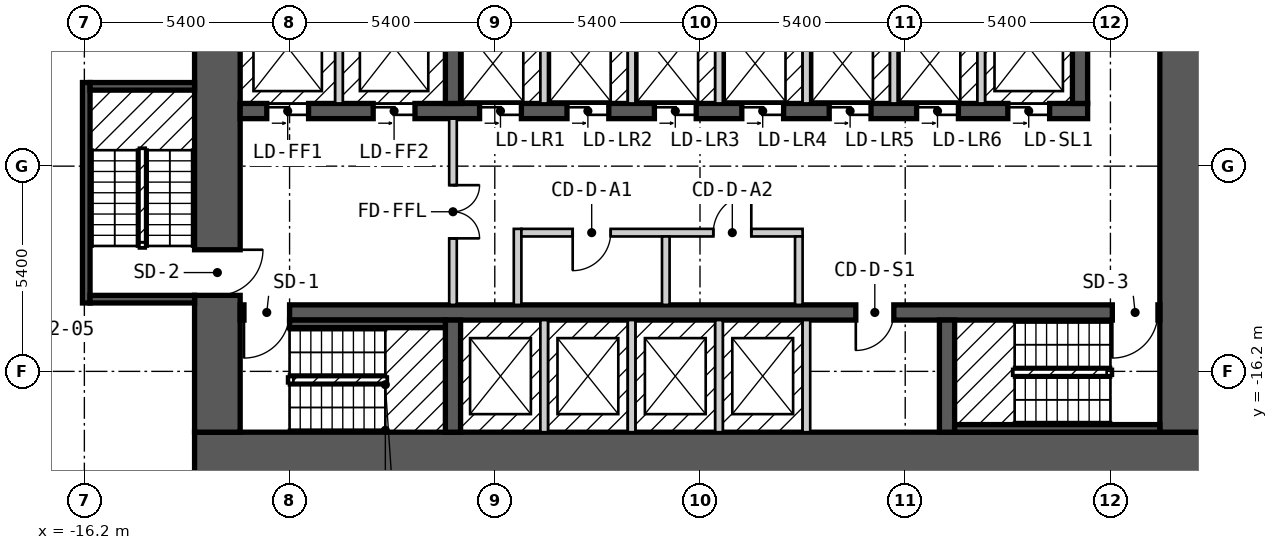
"""IFC4 building model, lengths in metres.
Left out: names, types, materials, properties, quantities, classifications, styles, units other than length and angle.
Written with IfcOpenShell. Run it as: python <this file> out.ifc"""

import sys

from ifc_helpers import new_model, si_unit, direction, frame, frame_2d, origin, place, context, subcontext, project, spatial, rectangle, extrude, element, fill, save


model = new_model("IFC4")
c1 = context("Model", 3, precision=1e-05, world=origin(), true_north=direction((0.0, 1.0)))
c2 = subcontext(c1, "Body", "Model", "MODEL_VIEW")
j1 = project(units=[si_unit("LENGTHUNIT", "METRE"), si_unit("PLANEANGLEUNIT", "RADIAN")], contexts=[c1])
p1 = place(None, origin())
s1 = spatial("IfcSite", under=j1, at=p1, CompositionType="ELEMENT")
p2 = place(p1, origin())
s2 = spatial("IfcBuilding", under=s1, at=p2, CompositionType="ELEMENT")
p3 = place(p2, frame((0.0, 0.0, 9.0)))
s3 = spatial("IfcBuildingStorey", under=s2, at=p3, CompositionType="ELEMENT", Elevation=9.0)
p4 = place(p3, frame((-13.3, -18.4, 0.0), z_axis=(0.0, 0.0, 1.0), x_axis=(1.0, 0.0, 0.0)))
e1 = element("IfcWall", 1, at=p4, inside=s3, PredefinedType="SHEAR", context=c2, shape_type="SweptSolid", body=[
    extrude(rectangle(XDim=26.6, YDim=1.2, at=frame_2d((13.3, 0.0))), origin(), (0.0, 0.0, 1.0), 3.25),
])
p5 = place(p3, frame((-12.7, -17.8, 0.0), z_axis=(0.0, 0.0, 1.0), x_axis=(0.0, 1.0, 0.0)))
e2 = element("IfcWall", 2, at=p5, inside=s3, PredefinedType="SHEAR", context=c2, shape_type="SweptSolid", body=[
    extrude(rectangle(XDim=11.6, YDim=1.2, at=frame_2d((5.8, 0.0))), origin(), (0.0, 0.0, 1.0), 3.25),
])
p6 = place(p5, frame((3.6, 0.0, 0.0)))
e3 = element("IfcOpeningElement", 3, at=p6, cuts=e2, PredefinedType="OPENING", context=c2, shape_type="SweptSolid", body=[
    extrude(rectangle(XDim=1.2, YDim=2.1, at=frame_2d((0.6, 1.05))), frame((0.0, 0.61, 0.0), z_axis=(0.0, -1.0, 0.0), x_axis=(1.0, 0.0, 0.0)), (0.0, 0.0, 1.0), 1.22),
])
p7 = place(p3, frame((12.7, -17.8, 0.0), z_axis=(0.0, 0.0, 1.0), x_axis=(0.0, 1.0, 0.0)))
e4 = element("IfcWall", 4, at=p7, inside=s3, PredefinedType="SHEAR", context=c2, shape_type="SweptSolid", body=[
    extrude(rectangle(XDim=11.6, YDim=1.2, at=frame_2d((5.8, 0.0))), origin(), (0.0, 0.0, 1.0), 3.25),
])
p8 = place(p3, frame((-12.1, -14.65, 0.0), z_axis=(0.0, 0.0, 1.0), x_axis=(1.0, 0.0, 0.0)))
e5 = element("IfcWall", 5, at=p8, inside=s3, PredefinedType="SHEAR", context=c2, shape_type="SweptSolid", body=[
    extrude(rectangle(XDim=24.2, YDim=0.4, at=frame_2d((12.1, 0.0))), origin(), (0.0, 0.0, 1.0), 3.25),
])
p9 = place(p8, frame((1.3, 0.0, 0.0), z_axis=(0.0, 0.0, 1.0), x_axis=(-1.0, 0.0, 0.0)))
e6 = element("IfcOpeningElement", 6, at=p9, cuts=e5, PredefinedType="OPENING", context=c2, shape_type="SweptSolid", body=[
    extrude(rectangle(XDim=1.2, YDim=2.1, at=frame_2d((0.6, 1.05))), frame((0.0, 0.21, 0.0), z_axis=(0.0, -1.0, 0.0), x_axis=(1.0, 0.0, 0.0)), (0.0, 0.0, 1.0), 0.42),
])
p10 = place(p8, frame((24.15, 0.0, 0.0), z_axis=(0.0, 0.0, 1.0), x_axis=(-1.0, 0.0, 0.0)))
e7 = element("IfcOpeningElement", 7, at=p10, cuts=e5, PredefinedType="OPENING", context=c2, shape_type="SweptSolid", body=[
    extrude(rectangle(XDim=1.2, YDim=2.1, at=frame_2d((0.6, 1.05))), frame((0.0, 0.21, 0.0), z_axis=(0.0, -1.0, 0.0), x_axis=(1.0, 0.0, 0.0)), (0.0, 0.0, 1.0), 0.42),
])
p11 = place(p8, frame((17.2, 0.0, 0.0), z_axis=(0.0, 0.0, 1.0), x_axis=(-1.0, 0.0, 0.0)))
e8 = element("IfcOpeningElement", 8, at=p11, cuts=e5, PredefinedType="OPENING", context=c2, shape_type="SweptSolid", body=[
    extrude(rectangle(XDim=1.0, YDim=2.1, at=frame_2d((0.5, 1.05))), frame((0.0, 0.21, 0.0), z_axis=(0.0, -1.0, 0.0), x_axis=(1.0, 0.0, 0.0)), (0.0, 0.0, 1.0), 0.42),
])
p12 = place(p3, frame((-12.1, -9.35, 0.0), z_axis=(0.0, 0.0, 1.0), x_axis=(1.0, 0.0, 0.0)))
e9 = element("IfcWall", 9, at=p12, inside=s3, PredefinedType="SHEAR", context=c2, shape_type="SweptSolid", body=[
    extrude(rectangle(XDim=22.3, YDim=0.4, at=frame_2d((11.15, 0.0))), origin(), (0.0, 0.0, 1.0), 3.25),
])
p13 = place(p12, frame((0.7, 0.0, 0.0)))
e10 = element("IfcOpeningElement", 10, at=p13, cuts=e9, PredefinedType="OPENING", context=c2, shape_type="SweptSolid", body=[
    extrude(rectangle(XDim=1.1, YDim=2.1, at=frame_2d((0.55, 1.05))), frame((0.0, 0.21, 0.0), z_axis=(0.0, -1.0, 0.0), x_axis=(1.0, 0.0, 0.0)), (0.0, 0.0, 1.0), 0.42),
])
p14 = place(p12, frame((3.5, 0.0, 0.0)))
e11 = element("IfcOpeningElement", 11, at=p14, cuts=e9, PredefinedType="OPENING", context=c2, shape_type="SweptSolid", body=[
    extrude(rectangle(XDim=1.1, YDim=2.1, at=frame_2d((0.55, 1.05))), frame((0.0, 0.21, 0.0), z_axis=(0.0, -1.0, 0.0), x_axis=(1.0, 0.0, 0.0)), (0.0, 0.0, 1.0), 0.42),
])
p15 = place(p12, frame((6.3, 0.0, 0.0)))
e12 = element("IfcOpeningElement", 12, at=p15, cuts=e9, PredefinedType="OPENING", context=c2, shape_type="SweptSolid", body=[
    extrude(rectangle(XDim=1.1, YDim=2.1, at=frame_2d((0.55, 1.05))), frame((0.0, 0.21, 0.0), z_axis=(0.0, -1.0, 0.0), x_axis=(1.0, 0.0, 0.0)), (0.0, 0.0, 1.0), 0.42),
])
p16 = place(p12, frame((8.6, 0.0, 0.0)))
e13 = element("IfcOpeningElement", 13, at=p16, cuts=e9, PredefinedType="OPENING", context=c2, shape_type="SweptSolid", body=[
    extrude(rectangle(XDim=1.1, YDim=2.1, at=frame_2d((0.55, 1.05))), frame((0.0, 0.21, 0.0), z_axis=(0.0, -1.0, 0.0), x_axis=(1.0, 0.0, 0.0)), (0.0, 0.0, 1.0), 0.42),
])
p17 = place(p12, frame((10.9, 0.0, 0.0)))
e14 = element("IfcOpeningElement", 14, at=p17, cuts=e9, PredefinedType="OPENING", context=c2, shape_type="SweptSolid", body=[
    extrude(rectangle(XDim=1.1, YDim=2.1, at=frame_2d((0.55, 1.05))), frame((0.0, 0.21, 0.0), z_axis=(0.0, -1.0, 0.0), x_axis=(1.0, 0.0, 0.0)), (0.0, 0.0, 1.0), 0.42),
])
p18 = place(p12, frame((13.2, 0.0, 0.0)))
e15 = element("IfcOpeningElement", 15, at=p18, cuts=e9, PredefinedType="OPENING", context=c2, shape_type="SweptSolid", body=[
    extrude(rectangle(XDim=1.1, YDim=2.1, at=frame_2d((0.55, 1.05))), frame((0.0, 0.21, 0.0), z_axis=(0.0, -1.0, 0.0), x_axis=(1.0, 0.0, 0.0)), (0.0, 0.0, 1.0), 0.42),
])
p19 = place(p12, frame((15.5, 0.0, 0.0)))
e16 = element("IfcOpeningElement", 16, at=p19, cuts=e9, PredefinedType="OPENING", context=c2, shape_type="SweptSolid", body=[
    extrude(rectangle(XDim=1.1, YDim=2.1, at=frame_2d((0.55, 1.05))), frame((0.0, 0.21, 0.0), z_axis=(0.0, -1.0, 0.0), x_axis=(1.0, 0.0, 0.0)), (0.0, 0.0, 1.0), 0.42),
])
p20 = place(p12, frame((17.8, 0.0, 0.0)))
e17 = element("IfcOpeningElement", 17, at=p20, cuts=e9, PredefinedType="OPENING", context=c2, shape_type="SweptSolid", body=[
    extrude(rectangle(XDim=1.1, YDim=2.1, at=frame_2d((0.55, 1.05))), frame((0.0, 0.21, 0.0), z_axis=(0.0, -1.0, 0.0), x_axis=(1.0, 0.0, 0.0)), (0.0, 0.0, 1.0), 0.42),
])
p21 = place(p12, frame((20.2, 0.0, 0.0)))
e18 = element("IfcOpeningElement", 18, at=p21, cuts=e9, PredefinedType="OPENING", context=c2, shape_type="SweptSolid", body=[
    extrude(rectangle(XDim=1.1, YDim=2.1, at=frame_2d((0.55, 1.05))), frame((0.0, 0.21, 0.0), z_axis=(0.0, -1.0, 0.0), x_axis=(1.0, 0.0, 0.0)), (0.0, 0.0, 1.0), 0.42),
])
for number, where, z_axis, x_axis in (
    (19, (-6.5, -17.8, 0.0), (0.0, 0.0, 1.0), (0.0, 1.0, 0.0)),
    (20, (6.5, -17.8, 0.0), (0.0, 0.0, 1.0), (0.0, 1.0, 0.0)),
    (21, (-6.5, -9.15, 0.0), (0.0, 0.0, 1.0), (0.0, 1.0, 0.0)),
    (22, (10.0, -9.15, 0.0), (0.0, 0.0, 1.0), (0.0, 1.0, 0.0)),
):
    element("IfcWall", number, at=place(p3, frame(where, z_axis=z_axis, x_axis=x_axis)), inside=s3, PredefinedType="SHEAR", context=c2, shape_type="SweptSolid", body=[
        extrude(rectangle(XDim=2.95, YDim=0.4, at=frame_2d((1.475, 0.0))), origin(), (0.0, 0.0, 1.0), 3.25),
    ])
p22 = place(p3, frame((-16.15, -14.4, 0.0), z_axis=(0.0, 0.0, 1.0), x_axis=(0.0, 1.0, 0.0)))
e23 = element("IfcWall", 23, at=p22, inside=s3, PredefinedType="SOLIDWALL", context=c2, shape_type="SweptSolid", body=[
    extrude(rectangle(XDim=5.8, YDim=0.2, at=frame_2d((2.9, 0.0))), origin(), (0.0, 0.0, 1.0), 3.25),
])
for number, where, z_axis, x_axis in (
    (24, (-16.05, -14.3, 0.0), (0.0, 0.0, 1.0), (1.0, 0.0, 0.0)),
    (25, (-16.05, -8.7, 0.0), (0.0, 0.0, 1.0), (1.0, 0.0, 0.0)),
):
    element("IfcWall", number, at=place(p3, frame(where, z_axis=z_axis, x_axis=x_axis)), inside=s3, PredefinedType="SOLIDWALL", context=c2, shape_type="SweptSolid", body=[
        extrude(rectangle(XDim=2.75, YDim=0.2, at=frame_2d((1.375, 0.0))), origin(), (0.0, 0.0, 1.0), 3.25),
    ])
p23 = place(p3, frame((-10.8, -14.95, 0.0), z_axis=(0.0, 0.0, 1.0), x_axis=(1.0, 0.0, 0.0)))
e26 = element("IfcWall", 26, at=p23, inside=s3, PredefinedType="SOLIDWALL", context=c2, shape_type="SweptSolid", body=[
    extrude(rectangle(XDim=4.1, YDim=0.2, at=frame_2d((2.05, 0.0))), origin(), (0.0, 0.0, 1.0), 3.25),
])
p24 = place(p3, frame((-9.5, -9.15, 0.0), z_axis=(0.0, 0.0, 1.0), x_axis=(0.0, 1.0, 0.0)))
e27 = element("IfcWall", 27, at=p24, inside=s3, PredefinedType="SOLIDWALL", context=c2, shape_type="SweptSolid", body=[
    extrude(rectangle(XDim=2.95, YDim=0.2, at=frame_2d((1.475, 0.0))), origin(), (0.0, 0.0, 1.0), 3.25),
])
p25 = place(p3, frame((-6.5, -14.45, 0.0), z_axis=(0.0, 0.0, 1.0), x_axis=(0.0, 1.0, 0.0)))
e28 = element("IfcWall", 28, at=p25, inside=s3, PredefinedType="PARTITIONING", context=c2, shape_type="SweptSolid", body=[
    extrude(rectangle(XDim=4.9, YDim=0.2, at=frame_2d((2.45, 0.0))), origin(), (0.0, 0.0, 1.0), 3.25),
])
p26 = place(p25, frame((3.15, 0.0, 0.0), z_axis=(0.0, 0.0, 1.0), x_axis=(-1.0, 0.0, 0.0)))
e29 = element("IfcOpeningElement", 29, at=p26, cuts=e28, PredefinedType="OPENING", context=c2, shape_type="SweptSolid", body=[
    extrude(rectangle(XDim=1.4, YDim=2.1, at=frame_2d((0.7, 1.05))), frame((0.0, 0.11, 0.0), z_axis=(0.0, -1.0, 0.0), x_axis=(1.0, 0.0, 0.0)), (0.0, 0.0, 1.0), 0.22),
])
p27 = place(p3, frame((-4.8, -14.45, 0.0), z_axis=(0.0, 0.0, 1.0), x_axis=(0.0, 1.0, 0.0)))
e30 = element("IfcWall", 30, at=p27, inside=s3, PredefinedType="PARTITIONING", context=c2, shape_type="SweptSolid", body=[
    extrude(rectangle(XDim=2.0, YDim=0.2, at=frame_2d((1.0, 0.0))), origin(), (0.0, 0.0, 1.0), 3.25),
])
p28 = place(p3, frame((-4.7, -12.55, 0.0), z_axis=(0.0, 0.0, 1.0), x_axis=(1.0, 0.0, 0.0)))
e31 = element("IfcWall", 31, at=p28, inside=s3, PredefinedType="PARTITIONING", context=c2, shape_type="SweptSolid", body=[
    extrude(rectangle(XDim=7.4, YDim=0.2, at=frame_2d((3.7, 0.0))), origin(), (0.0, 0.0, 1.0), 3.25),
])
p29 = place(p28, frame((2.35, 0.0, 0.0), z_axis=(0.0, 0.0, 1.0), x_axis=(-1.0, 0.0, 0.0)))
e32 = element("IfcOpeningElement", 32, at=p29, cuts=e31, PredefinedType="OPENING", context=c2, shape_type="SweptSolid", body=[
    extrude(rectangle(XDim=1.0, YDim=2.1, at=frame_2d((0.5, 1.05))), frame((0.0, 0.11, 0.0), z_axis=(0.0, -1.0, 0.0), x_axis=(1.0, 0.0, 0.0)), (0.0, 0.0, 1.0), 0.22),
])
p30 = place(p28, frame((6.05, 0.0, 0.0), z_axis=(0.0, 0.0, 1.0), x_axis=(-1.0, 0.0, 0.0)))
e33 = element("IfcOpeningElement", 33, at=p30, cuts=e31, PredefinedType="OPENING", context=c2, shape_type="SweptSolid", body=[
    extrude(rectangle(XDim=1.0, YDim=2.1, at=frame_2d((0.5, 1.05))), frame((0.0, 0.11, 0.0), z_axis=(0.0, -1.0, 0.0), x_axis=(1.0, 0.0, 0.0)), (0.0, 0.0, 1.0), 0.22),
])
for number, where, z_axis, x_axis in (
    (34, (-4.1, -17.8, 0.0), (0.0, 0.0, 1.0), (0.0, 1.0, 0.0)),
    (35, (-4.1, -9.15, 0.0), (0.0, 0.0, 1.0), (0.0, 1.0, 0.0)),
    (36, (-1.8, -17.8, 0.0), (0.0, 0.0, 1.0), (0.0, 1.0, 0.0)),
    (37, (-1.8, -9.15, 0.0), (0.0, 0.0, 1.0), (0.0, 1.0, 0.0)),
):
    element("IfcWall", number, at=place(p3, frame(where, z_axis=z_axis, x_axis=x_axis)), inside=s3, PredefinedType="SOLIDWALL", context=c2, shape_type="SweptSolid", body=[
        extrude(rectangle(XDim=2.95, YDim=0.2, at=frame_2d((1.475, 0.0))), origin(), (0.0, 0.0, 1.0), 3.25),
    ])
p31 = place(p3, frame((-0.9, -14.45, 0.0), z_axis=(0.0, 0.0, 1.0), x_axis=(0.0, 1.0, 0.0)))
e38 = element("IfcWall", 38, at=p31, inside=s3, PredefinedType="PARTITIONING", context=c2, shape_type="SweptSolid", body=[
    extrude(rectangle(XDim=1.8, YDim=0.2, at=frame_2d((0.9, 0.0))), origin(), (0.0, 0.0, 1.0), 3.25),
])
for number, where, z_axis, x_axis in (
    (39, (0.5, -17.8, 0.0), (0.0, 0.0, 1.0), (0.0, 1.0, 0.0)),
    (40, (0.5, -9.15, 0.0), (0.0, 0.0, 1.0), (0.0, 1.0, 0.0)),
):
    element("IfcWall", number, at=place(p3, frame(where, z_axis=z_axis, x_axis=x_axis)), inside=s3, PredefinedType="SOLIDWALL", context=c2, shape_type="SweptSolid", body=[
        extrude(rectangle(XDim=2.95, YDim=0.2, at=frame_2d((1.475, 0.0))), origin(), (0.0, 0.0, 1.0), 3.25),
    ])
p32 = place(p3, frame((2.6, -14.45, 0.0), z_axis=(0.0, 0.0, 1.0), x_axis=(0.0, 1.0, 0.0)))
e41 = element("IfcWall", 41, at=p32, inside=s3, PredefinedType="PARTITIONING", context=c2, shape_type="SweptSolid", body=[
    extrude(rectangle(XDim=1.8, YDim=0.2, at=frame_2d((0.9, 0.0))), origin(), (0.0, 0.0, 1.0), 3.25),
])
for number, where, z_axis, x_axis in (
    (42, (2.8, -17.8, 0.0), (0.0, 0.0, 1.0), (0.0, 1.0, 0.0)),
    (43, (2.8, -9.15, 0.0), (0.0, 0.0, 1.0), (0.0, 1.0, 0.0)),
    (44, (5.1, -9.15, 0.0), (0.0, 0.0, 1.0), (0.0, 1.0, 0.0)),
):
    element("IfcWall", number, at=place(p3, frame(where, z_axis=z_axis, x_axis=x_axis)), inside=s3, PredefinedType="SOLIDWALL", context=c2, shape_type="SweptSolid", body=[
        extrude(rectangle(XDim=2.95, YDim=0.2, at=frame_2d((1.475, 0.0))), origin(), (0.0, 0.0, 1.0), 3.25),
    ])
p33 = place(p3, frame((6.7, -17.7, 0.0), z_axis=(0.0, 0.0, 1.0), x_axis=(1.0, 0.0, 0.0)))
e45 = element("IfcWall", 45, at=p33, inside=s3, PredefinedType="SOLIDWALL", context=c2, shape_type="SweptSolid", body=[
    extrude(rectangle(XDim=5.4, YDim=0.2, at=frame_2d((2.7, 0.0))), origin(), (0.0, 0.0, 1.0), 3.25),
])
p34 = place(p3, frame((7.4, -9.15, 0.0), z_axis=(0.0, 0.0, 1.0), x_axis=(0.0, 1.0, 0.0)))
e46 = element("IfcWall", 46, at=p34, inside=s3, PredefinedType="SOLIDWALL", context=c2, shape_type="SweptSolid", body=[
    extrude(rectangle(XDim=2.95, YDim=0.2, at=frame_2d((1.475, 0.0))), origin(), (0.0, 0.0, 1.0), 3.25),
])
p35 = place(p13, origin())
e47 = element("IfcDoor", 47, at=p35, inside=s3, OperationType="DOUBLE_DOOR_SLIDING", PredefinedType="DOOR", context=c2, shape_type="SweptSolid", body=[
    extrude(rectangle(XDim=1.1, YDim=2.1, at=frame_2d((0.55, 1.05))), frame((0.0, 0.025, 0.0), z_axis=(0.0, -1.0, 0.0), x_axis=(1.0, 0.0, 0.0)), (0.0, 0.0, 1.0), 0.05),
])
fill(e10, e47)
p36 = place(p14, origin())
e48 = element("IfcDoor", 48, at=p36, inside=s3, OperationType="DOUBLE_DOOR_SLIDING", PredefinedType="DOOR", context=c2, shape_type="SweptSolid", body=[
    extrude(rectangle(XDim=1.1, YDim=2.1, at=frame_2d((0.55, 1.05))), frame((0.0, 0.025, 0.0), z_axis=(0.0, -1.0, 0.0), x_axis=(1.0, 0.0, 0.0)), (0.0, 0.0, 1.0), 0.05),
])
fill(e11, e48)
p37 = place(p15, origin())
e49 = element("IfcDoor", 49, at=p37, inside=s3, OperationType="DOUBLE_DOOR_SLIDING", PredefinedType="DOOR", context=c2, shape_type="SweptSolid", body=[
    extrude(rectangle(XDim=1.1, YDim=2.1, at=frame_2d((0.55, 1.05))), frame((0.0, 0.025, 0.0), z_axis=(0.0, -1.0, 0.0), x_axis=(1.0, 0.0, 0.0)), (0.0, 0.0, 1.0), 0.05),
])
fill(e12, e49)
p38 = place(p16, origin())
e50 = element("IfcDoor", 50, at=p38, inside=s3, OperationType="DOUBLE_DOOR_SLIDING", PredefinedType="DOOR", context=c2, shape_type="SweptSolid", body=[
    extrude(rectangle(XDim=1.1, YDim=2.1, at=frame_2d((0.55, 1.05))), frame((0.0, 0.025, 0.0), z_axis=(0.0, -1.0, 0.0), x_axis=(1.0, 0.0, 0.0)), (0.0, 0.0, 1.0), 0.05),
])
fill(e13, e50)
p39 = place(p17, origin())
e51 = element("IfcDoor", 51, at=p39, inside=s3, OperationType="DOUBLE_DOOR_SLIDING", PredefinedType="DOOR", context=c2, shape_type="SweptSolid", body=[
    extrude(rectangle(XDim=1.1, YDim=2.1, at=frame_2d((0.55, 1.05))), frame((0.0, 0.025, 0.0), z_axis=(0.0, -1.0, 0.0), x_axis=(1.0, 0.0, 0.0)), (0.0, 0.0, 1.0), 0.05),
])
fill(e14, e51)
p40 = place(p18, origin())
e52 = element("IfcDoor", 52, at=p40, inside=s3, OperationType="DOUBLE_DOOR_SLIDING", PredefinedType="DOOR", context=c2, shape_type="SweptSolid", body=[
    extrude(rectangle(XDim=1.1, YDim=2.1, at=frame_2d((0.55, 1.05))), frame((0.0, 0.025, 0.0), z_axis=(0.0, -1.0, 0.0), x_axis=(1.0, 0.0, 0.0)), (0.0, 0.0, 1.0), 0.05),
])
fill(e15, e52)
p41 = place(p19, origin())
e53 = element("IfcDoor", 53, at=p41, inside=s3, OperationType="DOUBLE_DOOR_SLIDING", PredefinedType="DOOR", context=c2, shape_type="SweptSolid", body=[
    extrude(rectangle(XDim=1.1, YDim=2.1, at=frame_2d((0.55, 1.05))), frame((0.0, 0.025, 0.0), z_axis=(0.0, -1.0, 0.0), x_axis=(1.0, 0.0, 0.0)), (0.0, 0.0, 1.0), 0.05),
])
fill(e16, e53)
p42 = place(p20, origin())
e54 = element("IfcDoor", 54, at=p42, inside=s3, OperationType="DOUBLE_DOOR_SLIDING", PredefinedType="DOOR", context=c2, shape_type="SweptSolid", body=[
    extrude(rectangle(XDim=1.1, YDim=2.1, at=frame_2d((0.55, 1.05))), frame((0.0, 0.025, 0.0), z_axis=(0.0, -1.0, 0.0), x_axis=(1.0, 0.0, 0.0)), (0.0, 0.0, 1.0), 0.05),
])
fill(e17, e54)
p43 = place(p21, origin())
e55 = element("IfcDoor", 55, at=p43, inside=s3, OperationType="DOUBLE_DOOR_SLIDING", PredefinedType="DOOR", context=c2, shape_type="SweptSolid", body=[
    extrude(rectangle(XDim=1.1, YDim=2.1, at=frame_2d((0.55, 1.05))), frame((0.0, 0.025, 0.0), z_axis=(0.0, -1.0, 0.0), x_axis=(1.0, 0.0, 0.0)), (0.0, 0.0, 1.0), 0.05),
])
fill(e18, e55)
p44 = place(p9, origin())
e56 = element("IfcDoor", 56, at=p44, inside=s3, OperationType="SINGLE_SWING_RIGHT", PredefinedType="DOOR", context=c2, shape_type="SweptSolid", body=[
    extrude(rectangle(XDim=1.2, YDim=2.1, at=frame_2d((0.6, 1.05))), frame((0.0, 0.025, 0.0), z_axis=(0.0, -1.0, 0.0), x_axis=(1.0, 0.0, 0.0)), (0.0, 0.0, 1.0), 0.05),
])
fill(e6, e56)
p45 = place(p10, origin())
e57 = element("IfcDoor", 57, at=p45, inside=s3, OperationType="SINGLE_SWING_RIGHT", PredefinedType="DOOR", context=c2, shape_type="SweptSolid", body=[
    extrude(rectangle(XDim=1.2, YDim=2.1, at=frame_2d((0.6, 1.05))), frame((0.0, 0.025, 0.0), z_axis=(0.0, -1.0, 0.0), x_axis=(1.0, 0.0, 0.0)), (0.0, 0.0, 1.0), 0.05),
])
fill(e7, e57)
p46 = place(p6, origin())
e58 = element("IfcDoor", 58, at=p46, inside=s3, OperationType="SINGLE_SWING_RIGHT", PredefinedType="DOOR", context=c2, shape_type="SweptSolid", body=[
    extrude(rectangle(XDim=1.2, YDim=2.1, at=frame_2d((0.6, 1.05))), frame((0.0, 0.025, 0.0), z_axis=(0.0, -1.0, 0.0), x_axis=(1.0, 0.0, 0.0)), (0.0, 0.0, 1.0), 0.05),
])
fill(e3, e58)
p47 = place(p26, origin())
e59 = element("IfcDoor", 59, at=p47, inside=s3, OperationType="DOUBLE_DOOR_SINGLE_SWING", PredefinedType="DOOR", context=c2, shape_type="SweptSolid", body=[
    extrude(rectangle(XDim=1.4, YDim=2.1, at=frame_2d((0.7, 1.05))), frame((0.0, 0.025, 0.0), z_axis=(0.0, -1.0, 0.0), x_axis=(1.0, 0.0, 0.0)), (0.0, 0.0, 1.0), 0.05),
])
fill(e29, e59)
p48 = place(p29, origin())
e60 = element("IfcDoor", 60, at=p48, inside=s3, OperationType="SINGLE_SWING_RIGHT", PredefinedType="DOOR", context=c2, shape_type="SweptSolid", body=[
    extrude(rectangle(XDim=1.0, YDim=2.1, at=frame_2d((0.5, 1.05))), frame((0.0, 0.025, 0.0), z_axis=(0.0, -1.0, 0.0), x_axis=(1.0, 0.0, 0.0)), (0.0, 0.0, 1.0), 0.05),
])
fill(e32, e60)
p49 = place(p30, origin())
e61 = element("IfcDoor", 61, at=p49, inside=s3, OperationType="SINGLE_SWING_LEFT", PredefinedType="DOOR", context=c2, shape_type="SweptSolid", body=[
    extrude(rectangle(XDim=1.0, YDim=2.1, at=frame_2d((0.5, 1.05))), frame((0.0, 0.025, 0.0), z_axis=(0.0, -1.0, 0.0), x_axis=(1.0, 0.0, 0.0)), (0.0, 0.0, 1.0), 0.05),
])
fill(e33, e61)
p50 = place(p11, origin())
e62 = element("IfcDoor", 62, at=p50, inside=s3, OperationType="SINGLE_SWING_RIGHT", PredefinedType="DOOR", context=c2, shape_type="SweptSolid", body=[
    extrude(rectangle(XDim=1.0, YDim=2.1, at=frame_2d((0.5, 1.05))), frame((0.0, 0.025, 0.0), z_axis=(0.0, -1.0, 0.0), x_axis=(1.0, 0.0, 0.0)), (0.0, 0.0, 1.0), 0.05),
])
fill(e8, e62)
save(model, sys.argv[1])
